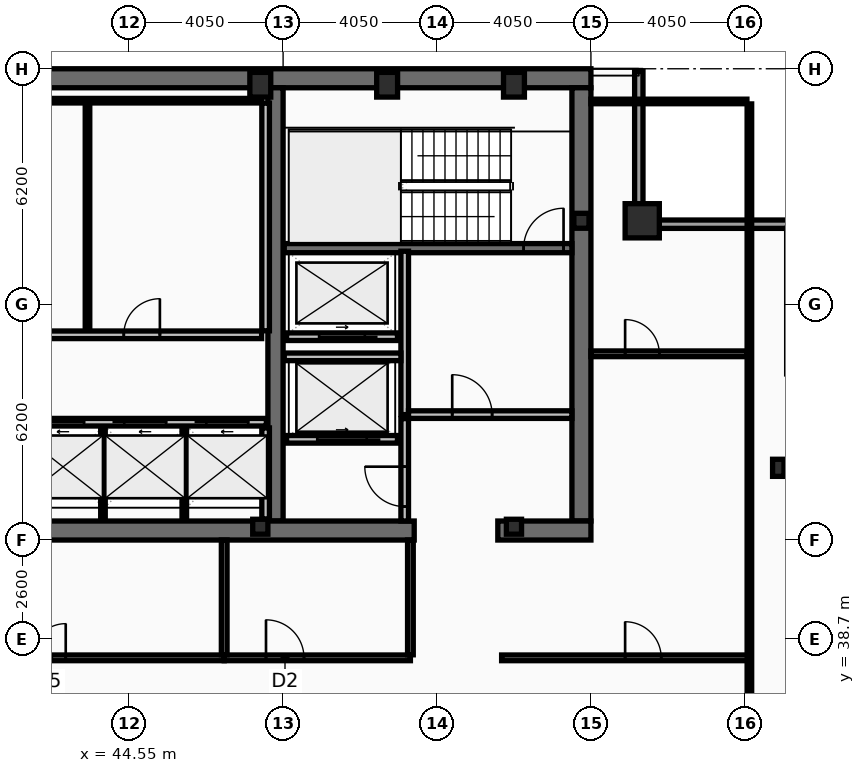
"""IFC4 building model, lengths in metres.
Left out: names, types, materials, properties, quantities, classifications, styles, units other than length and angle.
Written with IfcOpenShell. Run it as: python <this file> out.ifc"""

import sys

from ifc_helpers import new_model, si_unit, direction, frame, frame_2d, origin, origin_2d, place, context, subcontext, project, spatial, rectangle, hollow_rectangle, i_section, extrude, element, fill, save


model = new_model("IFC4")
c1 = context("Model", 3, precision=1e-05, world=origin(), true_north=direction((0.0, 1.0)))
c2 = subcontext(c1, "Body", "Model", "MODEL_VIEW")
j1 = project(units=[si_unit("LENGTHUNIT", "METRE"), si_unit("PLANEANGLEUNIT", "RADIAN")], contexts=[c1])
p1 = place(None, origin())
s1 = spatial("IfcSite", under=j1, at=p1, CompositionType="ELEMENT")
p2 = place(p1, origin())
s2 = spatial("IfcBuilding", under=s1, at=p2, CompositionType="ELEMENT")
p3 = place(p2, frame((0.0, 0.0, 325.4)))
s3 = spatial("IfcBuildingStorey", under=s2, at=p3, CompositionType="ELEMENT", Elevation=325.4)
p4 = place(p3, frame((16.2, 53.45, 0.0), z_axis=(0.0, 0.0, 1.0), x_axis=(1.0, 0.0, 0.0)))
e1 = element("IfcWall", 1, at=p4, inside=s3, PredefinedType="SHEAR", context=c2, shape_type="SweptSolid", body=[
    extrude(rectangle(XDim=40.5, YDim=0.5, at=frame_2d((20.25, 0.0))), origin(), (0.0, 0.0, 1.0), 3.44),
])
p5 = place(p3, frame((56.45, 53.2, 0.0), z_axis=(0.0, 0.0, 1.0), x_axis=(0.0, -1.0, 0.0)))
e2 = element("IfcWall", 2, at=p5, inside=s3, PredefinedType="SHEAR", context=c2, shape_type="SweptSolid", body=[
    extrude(rectangle(XDim=11.4, YDim=0.5, at=frame_2d((5.7, 0.0))), origin(), (0.0, 0.0, 1.0), 3.44),
])
p6 = place(p3, frame((48.4, 41.8, 0.0), z_axis=(0.0, 0.0, 1.0), x_axis=(0.0, 1.0, 0.0)))
e3 = element("IfcWall", 3, at=p6, inside=s3, PredefinedType="SHEAR", context=c2, shape_type="SweptSolid", body=[
    extrude(rectangle(XDim=11.4, YDim=0.4, at=frame_2d((5.7, 0.0))), origin(), (0.0, 0.0, 1.0), 3.44),
])
p7 = place(p3, frame((52.05, 41.55, 0.0), z_axis=(0.0, 0.0, 1.0), x_axis=(-1.0, 0.0, 0.0)))
e4 = element("IfcWall", 4, at=p7, inside=s3, PredefinedType="SHEAR", context=c2, shape_type="SweptSolid", body=[
    extrude(rectangle(XDim=11.3, YDim=0.5, at=frame_2d((5.65, 0.0))), origin(), (0.0, 0.0, 1.0), 3.44),
])
p8 = place(p3, frame((56.7, 41.55, 0.0), z_axis=(0.0, 0.0, 1.0), x_axis=(-1.0, 0.0, 0.0)))
e5 = element("IfcWall", 5, at=p8, inside=s3, PredefinedType="SHEAR", context=c2, shape_type="SweptSolid", body=[
    extrude(rectangle(XDim=2.45, YDim=0.5, at=frame_2d((1.225, 0.0))), origin(), (0.0, 0.0, 1.0), 3.44),
])
p9 = place(p3, frame((48.63, 48.98, 0.0), z_axis=(0.0, 0.0, 1.0), x_axis=(1.0, 0.0, 0.0)))
e6 = element("IfcWall", 6, at=p9, inside=s3, PredefinedType="SHEAR", context=c2, shape_type="SweptSolid", body=[
    extrude(rectangle(XDim=7.57, YDim=0.24, at=frame_2d((3.785, 0.0))), origin(), (0.0, 0.0, 1.0), 3.44),
])
p10 = place(p9, frame((6.3, 0.0, 0.0)))
e7 = element("IfcOpeningElement", 7, at=p10, cuts=e6, PredefinedType="OPENING", context=c2, shape_type="SweptSolid", body=[
    extrude(rectangle(XDim=1.05, YDim=2.15, at=frame_2d((0.525, 1.075))), frame((0.0, 0.13, 0.0), z_axis=(0.0, -1.0, 0.0), x_axis=(1.0, 0.0, 0.0)), (0.0, 0.0, 1.0), 0.26),
])
p11 = place(p3, frame((58.05, 49.7, 0.0), z_axis=(0.0, 0.0, 1.0), x_axis=(1.0, 0.0, 0.0)))
e8 = element("IfcColumn", 8, at=p11, inside=s3, PredefinedType="COLUMN", context=c2, shape_type="SweptSolid", body=[
    extrude(hollow_rectangle(XDim=0.9, YDim=0.9, WallThickness=0.05, at=origin_2d()), origin(), (0.0, 0.0, 1.0), 3.6),
])
for number, where, z_axis, x_axis in (
    (9, (48.0, 53.28, 0.0), (0.0, 0.0, 1.0), (1.0, 0.0, 0.0)),
    (10, (51.337, 53.28, 0.0), (0.0, 0.0, 1.0), (1.0, 0.0, 0.0)),
    (11, (54.675, 53.28, 0.0), (0.0, 0.0, 1.0), (1.0, 0.0, 0.0)),
):
    element("IfcColumn", number, at=place(p3, frame(where, z_axis=z_axis, x_axis=x_axis)), inside=s3, PredefinedType="COLUMN", context=c2, shape_type="SweptSolid", body=[
        extrude(hollow_rectangle(XDim=0.55, YDim=0.65, WallThickness=0.04, at=origin_2d()), origin(), (0.0, 0.0, 1.0), 3.6),
    ])
p12 = place(p3, frame((61.63, 43.2, 0.0), z_axis=(0.0, 0.0, 1.0), x_axis=(1.0, 0.0, 0.0)))
e12 = element("IfcColumn", 12, at=p12, inside=s3, PredefinedType="COLUMN", context=c2, shape_type="SweptSolid", body=[
    extrude(i_section(OverallWidth=0.3, OverallDepth=0.45, WebThickness=0.014, FlangeThickness=0.026, at=origin_2d()), origin(), (0.0, 0.0, 1.0), 3.6),
])
for number, where, z_axis, x_axis in (
    (13, (56.45, 49.7, 0.0), (0.0, 0.0, 1.0), (1.0, 0.0, 0.0)),
    (14, (48.0, 41.65, 0.0), (0.0, 0.0, 1.0), (1.0, 0.0, 0.0)),
    (15, (54.675, 41.65, 0.0), (0.0, 0.0, 1.0), (1.0, 0.0, 0.0)),
):
    element("IfcColumn", number, at=place(p3, frame(where, z_axis=z_axis, x_axis=x_axis)), inside=s3, PredefinedType="COLUMN", context=c2, shape_type="SweptSolid", body=[
        extrude(i_section(OverallWidth=0.399, OverallDepth=0.393, WebThickness=0.023, FlangeThickness=0.037, at=origin_2d()), origin(), (0.0, 0.0, 1.0), 3.6),
    ])
p13 = place(p3, frame((57.96, 53.63, 0.0), z_axis=(0.0, 0.0, 1.0), x_axis=(0.0, -1.0, 0.0)))
e16 = element("IfcWall", 16, at=p13, inside=s3, PredefinedType="SOLIDWALL", context=c2, shape_type="SweptSolid", body=[
    extrude(rectangle(XDim=3.91, YDim=0.22, at=frame_2d((1.955, 0.0))), origin(), (0.0, 0.0, 1.0), 2.88),
])
p14 = place(p3, frame((57.85, 49.61, 0.0), z_axis=(0.0, 0.0, 1.0), x_axis=(1.0, 0.0, 0.0)))
e17 = element("IfcWall", 17, at=p14, inside=s3, PredefinedType="SOLIDWALL", context=c2, shape_type="SweptSolid", body=[
    extrude(rectangle(XDim=4.22, YDim=0.22, at=frame_2d((2.11, 0.0))), origin(), (0.0, 0.0, 1.0), 2.88),
])
p15 = place(p3, frame((41.68, 44.4, 0.0), z_axis=(0.0, 0.0, 1.0), x_axis=(1.0, 0.0, 0.0)))
e18 = element("IfcWall", 18, at=p15, inside=s3, PredefinedType="PARTITIONING", context=c2, shape_type="SweptSolid", body=[
    extrude(rectangle(XDim=6.48, YDim=0.2, at=frame_2d((3.24, 0.0))), origin(), (0.0, 0.0, 1.0), 3.44),
])
p16 = place(p15, frame((0.58, 0.0, 0.0)))
e19 = element("IfcOpeningElement", 19, at=p16, cuts=e18, PredefinedType="OPENING", context=c2, shape_type="SweptSolid", body=[
    extrude(rectangle(XDim=1.1, YDim=2.18, at=frame_2d((0.55, 1.09))), frame((0.0, 0.11, 0.0), z_axis=(0.0, -1.0, 0.0), x_axis=(1.0, 0.0, 0.0)), (0.0, 0.0, 1.0), 0.22),
])
p17 = place(p15, frame((2.74, 0.0, 0.0)))
e20 = element("IfcOpeningElement", 20, at=p17, cuts=e18, PredefinedType="OPENING", context=c2, shape_type="SweptSolid", body=[
    extrude(rectangle(XDim=1.1, YDim=2.18, at=frame_2d((0.55, 1.09))), frame((0.0, 0.11, 0.0), z_axis=(0.0, -1.0, 0.0), x_axis=(1.0, 0.0, 0.0)), (0.0, 0.0, 1.0), 0.22),
])
p18 = place(p15, frame((4.9, 0.0, 0.0)))
e21 = element("IfcOpeningElement", 21, at=p18, cuts=e18, PredefinedType="OPENING", context=c2, shape_type="SweptSolid", body=[
    extrude(rectangle(XDim=1.1, YDim=2.18, at=frame_2d((0.55, 1.09))), frame((0.0, 0.11, 0.0), z_axis=(0.0, -1.0, 0.0), x_axis=(1.0, 0.0, 0.0)), (0.0, 0.0, 1.0), 0.22),
])
p19 = place(p3, frame((51.61, 43.95, 0.0), z_axis=(0.0, 0.0, 1.0), x_axis=(-1.0, 0.0, 0.0)))
e22 = element("IfcWall", 22, at=p19, inside=s3, PredefinedType="PARTITIONING", context=c2, shape_type="SweptSolid", body=[
    extrude(rectangle(XDim=2.92, YDim=0.2, at=frame_2d((1.46, 0.0))), origin(), (0.0, 0.0, 1.0), 3.44),
])
p20 = place(p19, frame((0.81, 0.0, 0.0)))
e23 = element("IfcOpeningElement", 23, at=p20, cuts=e22, PredefinedType="OPENING", context=c2, shape_type="SweptSolid", body=[
    extrude(rectangle(XDim=1.3, YDim=2.18, at=frame_2d((0.65, 1.09))), frame((0.0, 0.11, 0.0), z_axis=(0.0, -1.0, 0.0), x_axis=(1.0, 0.0, 0.0)), (0.0, 0.0, 1.0), 0.22),
])
p21 = place(p3, frame((51.61, 46.65, 0.0), z_axis=(0.0, 0.0, 1.0), x_axis=(-1.0, 0.0, 0.0)))
e24 = element("IfcWall", 24, at=p21, inside=s3, PredefinedType="PARTITIONING", context=c2, shape_type="SweptSolid", body=[
    extrude(rectangle(XDim=2.92, YDim=0.2, at=frame_2d((1.46, 0.0))), origin(), (0.0, 0.0, 1.0), 3.44),
])
p22 = place(p21, frame((0.86, 0.0, 0.0)))
e25 = element("IfcOpeningElement", 25, at=p22, cuts=e24, PredefinedType="OPENING", context=c2, shape_type="SweptSolid", body=[
    extrude(rectangle(XDim=1.2, YDim=2.18, at=frame_2d((0.6, 1.09))), frame((0.0, 0.11, 0.0), z_axis=(0.0, -1.0, 0.0), x_axis=(1.0, 0.0, 0.0)), (0.0, 0.0, 1.0), 0.22),
])
p23 = place(p3, frame((51.8, 44.6, 0.0), z_axis=(0.0, 0.0, 1.0), x_axis=(0.0, 1.0, 0.0)))
e26 = element("IfcWall", 26, at=p23, inside=s3, PredefinedType="PARTITIONING", context=c2, shape_type="SweptSolid", body=[
    extrude(rectangle(XDim=4.3, YDim=0.2, at=frame_2d((2.15, 0.0))), origin(), (0.0, 0.0, 1.0), 3.44),
])
p24 = place(p3, frame((51.9, 44.6, 0.0), z_axis=(0.0, 0.0, 1.0), x_axis=(1.0, 0.0, 0.0)))
e27 = element("IfcWall", 27, at=p24, inside=s3, PredefinedType="PARTITIONING", context=c2, shape_type="SweptSolid", body=[
    extrude(rectangle(XDim=4.3, YDim=0.2, at=frame_2d((2.15, 0.0))), origin(), (0.0, 0.0, 1.0), 3.44),
])
p25 = place(p24, frame((1.15, 0.0, 0.0)))
e28 = element("IfcOpeningElement", 28, at=p25, cuts=e27, PredefinedType="OPENING", context=c2, shape_type="SweptSolid", body=[
    extrude(rectangle(XDim=1.05, YDim=2.15, at=frame_2d((0.525, 1.075))), frame((0.0, 0.11, 0.0), z_axis=(0.0, -1.0, 0.0), x_axis=(1.0, 0.0, 0.0)), (0.0, 0.0, 1.0), 0.22),
])
p26 = place(p3, frame((48.63, 46.12, 0.0), z_axis=(0.0, 0.0, 1.0), x_axis=(1.0, 0.0, 0.0)))
e29 = element("IfcWall", 29, at=p26, inside=s3, PredefinedType="PARTITIONING", context=c2, shape_type="SweptSolid", body=[
    extrude(rectangle(XDim=3.07, YDim=0.2, at=frame_2d((1.535, 0.0))), origin(), (0.0, 0.0, 1.0), 3.44),
])
p27 = place(p3, frame((51.8, 41.8, 0.0), z_axis=(0.0, 0.0, 1.0), x_axis=(0.0, 1.0, 0.0)))
e30 = element("IfcWall", 30, at=p27, inside=s3, PredefinedType="PARTITIONING", context=c2, shape_type="SweptSolid", body=[
    extrude(rectangle(XDim=2.695, YDim=0.2, at=frame_2d((1.348, 0.0))), origin(), (0.0, 0.0, 1.0), 3.44),
])
p28 = place(p27, frame((0.38, 0.0, 0.0)))
e31 = element("IfcOpeningElement", 31, at=p28, cuts=e30, PredefinedType="OPENING", context=c2, shape_type="SweptSolid", body=[
    extrude(rectangle(XDim=1.05, YDim=2.15, at=frame_2d((0.525, 1.075))), frame((0.0, 0.11, 0.0), z_axis=(0.0, -1.0, 0.0), x_axis=(1.0, 0.0, 0.0)), (0.0, 0.0, 1.0), 0.22),
])
p29 = place(p3, frame((48.14, 46.805, 0.0), z_axis=(0.0, 0.0, 1.0), x_axis=(0.0, 1.0, 0.0)))
e32 = element("IfcWall", 32, at=p29, inside=s3, PredefinedType="PARTITIONING", context=c2, shape_type="SweptSolid", body=[
    extrude(rectangle(XDim=5.99, YDim=0.2, at=frame_2d((2.995, 0.0))), origin(), (0.0, 0.0, 1.0), 3.44),
])
p30 = place(p3, frame((40.685, 52.86, 0.0), z_axis=(0.0, 0.0, 1.0), x_axis=(1.0, 0.0, 0.0)))
e33 = element("IfcWall", 33, at=p30, inside=s3, PredefinedType="PARTITIONING", context=c2, shape_type="SweptSolid", body=[
    extrude(rectangle(XDim=7.35, YDim=0.12, at=frame_2d((3.675, 0.0))), origin(), (0.0, 0.0, 1.0), 3.44),
])
p31 = place(p3, frame((43.453, 46.805, 0.0), z_axis=(0.0, 0.0, 1.0), x_axis=(0.0, 1.0, 0.0)))
e34 = element("IfcWall", 34, at=p31, inside=s3, PredefinedType="PARTITIONING", context=c2, shape_type="SweptSolid", body=[
    extrude(rectangle(XDim=5.99, YDim=0.12, at=frame_2d((2.995, 0.0))), origin(), (0.0, 0.0, 1.0), 3.44),
])
p32 = place(p3, frame((40.685, 46.7, 0.0), z_axis=(0.0, 0.0, 1.0), x_axis=(1.0, 0.0, 0.0)))
e35 = element("IfcWall", 35, at=p32, inside=s3, PredefinedType="PARTITIONING", context=c2, shape_type="SweptSolid", body=[
    extrude(rectangle(XDim=7.35, YDim=0.2, at=frame_2d((3.675, 0.0))), origin(), (0.0, 0.0, 1.0), 3.44),
])
p33 = place(p32, frame((0.55, 0.0, 0.0)))
e36 = element("IfcOpeningElement", 36, at=p33, cuts=e35, PredefinedType="OPENING", context=c2, shape_type="SweptSolid", body=[
    extrude(rectangle(XDim=0.95, YDim=2.1, at=frame_2d((0.475, 1.05))), frame((0.0, 0.11, 0.0), z_axis=(0.0, -1.0, 0.0), x_axis=(1.0, 0.0, 0.0)), (0.0, 0.0, 1.0), 0.22),
])
p34 = place(p32, frame((3.723, 0.0, 0.0)))
e37 = element("IfcOpeningElement", 37, at=p34, cuts=e35, PredefinedType="OPENING", context=c2, shape_type="SweptSolid", body=[
    extrude(rectangle(XDim=0.95, YDim=2.1, at=frame_2d((0.475, 1.05))), frame((0.0, 0.11, 0.0), z_axis=(0.0, -1.0, 0.0), x_axis=(1.0, 0.0, 0.0)), (0.0, 0.0, 1.0), 0.22),
])
p35 = place(p3, frame((48.14, 41.85, 0.0), z_axis=(0.0, 0.0, 1.0), x_axis=(0.0, 1.0, 0.0)))
e38 = element("IfcWall", 38, at=p35, inside=s3, PredefinedType="PARTITIONING", context=c2, shape_type="SweptSolid", body=[
    extrude(rectangle(XDim=2.4, YDim=0.2, at=frame_2d((1.2, 0.0))), origin(), (0.0, 0.0, 1.0), 3.44),
])
for number, where, z_axis, x_axis in (
    (39, (43.86, 41.85, 0.0), (0.0, 0.0, 1.0), (0.0, 1.0, 0.0)),
    (40, (46.0, 41.85, 0.0), (0.0, 0.0, 1.0), (0.0, 1.0, 0.0)),
):
    element("IfcWall", number, at=place(p3, frame(where, z_axis=z_axis, x_axis=x_axis)), inside=s3, PredefinedType="PARTITIONING", context=c2, shape_type="SweptSolid", body=[
        extrude(rectangle(XDim=2.4, YDim=0.12, at=frame_2d((1.2, 0.0))), origin(), (0.0, 0.0, 1.0), 3.44),
    ])
p36 = place(p3, frame((40.88, 38.2, 0.0), z_axis=(0.0, 0.0, 1.0), x_axis=(1.0, 0.0, 0.0)))
e41 = element("IfcWall", 41, at=p36, inside=s3, PredefinedType="PARTITIONING", context=c2, shape_type="SweptSolid", body=[
    extrude(rectangle(XDim=6.17, YDim=0.15, at=frame_2d((3.085, 0.0))), origin(), (0.0, 0.0, 1.0), 3.44),
])
p37 = place(p36, frame((1.1, 0.0, 0.0)))
e42 = element("IfcOpeningElement", 42, at=p37, cuts=e41, PredefinedType="OPENING", context=c2, shape_type="SweptSolid", body=[
    extrude(rectangle(XDim=0.9, YDim=2.05, at=frame_2d((0.45, 1.025))), frame((0.0, 0.085, 0.0), z_axis=(0.0, -1.0, 0.0), x_axis=(1.0, 0.0, 0.0)), (0.0, 0.0, 1.0), 0.17),
])
p38 = place(p3, frame((47.05, 38.2, 0.0), z_axis=(0.0, 0.0, 1.0), x_axis=(1.0, 0.0, 0.0)))
e43 = element("IfcWall", 43, at=p38, inside=s3, PredefinedType="PARTITIONING", context=c2, shape_type="SweptSolid", body=[
    extrude(rectangle(XDim=4.9, YDim=0.15, at=frame_2d((2.45, 0.0))), origin(), (0.0, 0.0, 1.0), 2.83),
])
p39 = place(p38, frame((1.1, 0.0, 0.0)))
e44 = element("IfcOpeningElement", 44, at=p39, cuts=e43, PredefinedType="OPENING", context=c2, shape_type="SweptSolid", body=[
    extrude(rectangle(XDim=1.0, YDim=2.05, at=frame_2d((0.5, 1.025))), frame((0.0, 0.085, 0.0), z_axis=(0.0, -1.0, 0.0), x_axis=(1.0, 0.0, 0.0)), (0.0, 0.0, 1.0), 0.17),
])
for number, where, z_axis, x_axis in (
    (45, (47.05, 38.28, 0.0), (0.0, 0.0, 1.0), (0.0, 1.0, 0.0)),
    (46, (51.95, 38.28, 0.0), (0.0, 0.0, 1.0), (0.0, 1.0, 0.0)),
):
    element("IfcWall", number, at=place(p3, frame(where, z_axis=z_axis, x_axis=x_axis)), inside=s3, PredefinedType="PARTITIONING", context=c2, shape_type="SweptSolid", body=[
        extrude(rectangle(XDim=3.02, YDim=0.15, at=frame_2d((1.51, 0.0))), origin(), (0.0, 0.0, 1.0), 3.44),
    ])
p40 = place(p3, frame((54.35, 38.2, 0.0), z_axis=(0.0, 0.0, 1.0), x_axis=(1.0, 0.0, 0.0)))
e47 = element("IfcWall", 47, at=p40, inside=s3, PredefinedType="PARTITIONING", context=c2, shape_type="SweptSolid", body=[
    extrude(rectangle(XDim=6.52, YDim=0.15, at=frame_2d((3.26, 0.0))), origin(), (0.0, 0.0, 1.0), 2.83),
])
p41 = place(p40, frame((3.25, 0.0, 0.0)))
e48 = element("IfcOpeningElement", 48, at=p41, cuts=e47, PredefinedType="OPENING", context=c2, shape_type="SweptSolid", body=[
    extrude(rectangle(XDim=0.95, YDim=2.05, at=frame_2d((0.475, 1.025))), frame((0.0, 0.085, 0.0), z_axis=(0.0, -1.0, 0.0), x_axis=(1.0, 0.0, 0.0)), (0.0, 0.0, 1.0), 0.17),
])
p42 = place(p3, frame((56.7, 46.2, 0.0), z_axis=(0.0, 0.0, 1.0), x_axis=(1.0, 0.0, 0.0)))
e49 = element("IfcWall", 49, at=p42, inside=s3, PredefinedType="PARTITIONING", context=c2, shape_type="SweptSolid", body=[
    extrude(rectangle(XDim=4.105, YDim=0.15, at=frame_2d((2.052, 0.0))), origin(), (0.0, 0.0, 1.0), 2.88),
])
p43 = place(p42, frame((0.9, 0.0, 0.0)))
e50 = element("IfcOpeningElement", 50, at=p43, cuts=e49, PredefinedType="OPENING", context=c2, shape_type="SweptSolid", body=[
    extrude(rectangle(XDim=0.9, YDim=2.05, at=frame_2d((0.45, 1.025))), frame((0.0, 0.085, 0.0), z_axis=(0.0, -1.0, 0.0), x_axis=(1.0, 0.0, 0.0)), (0.0, 0.0, 1.0), 0.17),
])
p44 = place(p3, frame((60.87, 10.665, 0.0), z_axis=(0.0, 0.0, 1.0), x_axis=(0.0, 1.0, 0.0)))
e51 = element("IfcWall", 51, at=p44, inside=s3, PredefinedType="PARTITIONING", context=c2, shape_type="SweptSolid", body=[
    extrude(rectangle(XDim=42.11, YDim=0.12, at=frame_2d((21.055, 0.0))), origin(), (0.0, 0.0, 1.0), 2.83),
])
p45 = place(p3, frame((56.7, 52.84, 0.0), z_axis=(0.0, 0.0, 1.0), x_axis=(1.0, 0.0, 0.0)))
e52 = element("IfcWall", 52, at=p45, inside=s3, PredefinedType="PARTITIONING", context=c2, shape_type="SweptSolid", body=[
    extrude(rectangle(XDim=4.105, YDim=0.12, at=frame_2d((2.052, 0.0))), origin(), (0.0, 0.0, 1.0), 3.44),
])
p46 = place(p10, origin())
e53 = element("IfcDoor", 53, at=p46, inside=s3, OperationType="SINGLE_SWING_RIGHT", PredefinedType="DOOR", context=c2, shape_type="SweptSolid", body=[
    extrude(rectangle(XDim=1.05, YDim=2.15, at=frame_2d((0.525, 1.075))), frame((0.0, 0.025, 0.0), z_axis=(0.0, -1.0, 0.0), x_axis=(1.0, 0.0, 0.0)), (0.0, 0.0, 1.0), 0.05),
])
fill(e7, e53)
p47 = place(p16, origin())
e54 = element("IfcDoor", 54, at=p47, inside=s3, OperationType="SLIDING_TO_LEFT", PredefinedType="DOOR", context=c2, shape_type="SweptSolid", body=[
    extrude(rectangle(XDim=1.1, YDim=2.18, at=frame_2d((0.55, 1.09))), frame((0.0, 0.025, 0.0), z_axis=(0.0, -1.0, 0.0), x_axis=(1.0, 0.0, 0.0)), (0.0, 0.0, 1.0), 0.05),
])
fill(e19, e54)
p48 = place(p17, origin())
e55 = element("IfcDoor", 55, at=p48, inside=s3, OperationType="SLIDING_TO_LEFT", PredefinedType="DOOR", context=c2, shape_type="SweptSolid", body=[
    extrude(rectangle(XDim=1.1, YDim=2.18, at=frame_2d((0.55, 1.09))), frame((0.0, 0.025, 0.0), z_axis=(0.0, -1.0, 0.0), x_axis=(1.0, 0.0, 0.0)), (0.0, 0.0, 1.0), 0.05),
])
fill(e20, e55)
p49 = place(p18, origin())
e56 = element("IfcDoor", 56, at=p49, inside=s3, OperationType="SLIDING_TO_LEFT", PredefinedType="DOOR", context=c2, shape_type="SweptSolid", body=[
    extrude(rectangle(XDim=1.1, YDim=2.18, at=frame_2d((0.55, 1.09))), frame((0.0, 0.025, 0.0), z_axis=(0.0, -1.0, 0.0), x_axis=(1.0, 0.0, 0.0)), (0.0, 0.0, 1.0), 0.05),
])
fill(e21, e56)
p50 = place(p20, origin())
e57 = element("IfcDoor", 57, at=p50, inside=s3, OperationType="SLIDING_TO_LEFT", PredefinedType="DOOR", context=c2, shape_type="SweptSolid", body=[
    extrude(rectangle(XDim=1.3, YDim=2.18, at=frame_2d((0.65, 1.09))), frame((0.0, 0.025, 0.0), z_axis=(0.0, -1.0, 0.0), x_axis=(1.0, 0.0, 0.0)), (0.0, 0.0, 1.0), 0.05),
])
fill(e23, e57)
p51 = place(p22, origin())
e58 = element("IfcDoor", 58, at=p51, inside=s3, OperationType="SLIDING_TO_LEFT", PredefinedType="DOOR", context=c2, shape_type="SweptSolid", body=[
    extrude(rectangle(XDim=1.2, YDim=2.18, at=frame_2d((0.6, 1.09))), frame((0.0, 0.025, 0.0), z_axis=(0.0, -1.0, 0.0), x_axis=(1.0, 0.0, 0.0)), (0.0, 0.0, 1.0), 0.05),
])
fill(e25, e58)
p52 = place(p25, origin())
e59 = element("IfcDoor", 59, at=p52, inside=s3, OperationType="SINGLE_SWING_LEFT", PredefinedType="DOOR", context=c2, shape_type="SweptSolid", body=[
    extrude(rectangle(XDim=1.05, YDim=2.15, at=frame_2d((0.525, 1.075))), frame((0.0, 0.025, 0.0), z_axis=(0.0, -1.0, 0.0), x_axis=(1.0, 0.0, 0.0)), (0.0, 0.0, 1.0), 0.05),
])
fill(e28, e59)
p53 = place(p28, origin())
e60 = element("IfcDoor", 60, at=p53, inside=s3, OperationType="SINGLE_SWING_RIGHT", PredefinedType="DOOR", context=c2, shape_type="SweptSolid", body=[
    extrude(rectangle(XDim=1.05, YDim=2.15, at=frame_2d((0.525, 1.075))), frame((0.0, 0.025, 0.0), z_axis=(0.0, -1.0, 0.0), x_axis=(1.0, 0.0, 0.0)), (0.0, 0.0, 1.0), 0.05),
])
fill(e31, e60)
p54 = place(p34, origin())
e61 = element("IfcDoor", 61, at=p54, inside=s3, OperationType="SINGLE_SWING_RIGHT", PredefinedType="DOOR", context=c2, shape_type="SweptSolid", body=[
    extrude(rectangle(XDim=0.95, YDim=2.1, at=frame_2d((0.475, 1.05))), frame((0.0, 0.025, 0.0), z_axis=(0.0, -1.0, 0.0), x_axis=(1.0, 0.0, 0.0)), (0.0, 0.0, 1.0), 0.05),
])
fill(e37, e61)
p55 = place(p37, origin())
e62 = element("IfcDoor", 62, at=p55, inside=s3, OperationType="SINGLE_SWING_RIGHT", PredefinedType="DOOR", context=c2, shape_type="SweptSolid", body=[
    extrude(rectangle(XDim=0.9, YDim=2.05, at=frame_2d((0.45, 1.025))), frame((0.0, 0.025, 0.0), z_axis=(0.0, -1.0, 0.0), x_axis=(1.0, 0.0, 0.0)), (0.0, 0.0, 1.0), 0.05),
])
fill(e42, e62)
p56 = place(p39, origin())
e63 = element("IfcDoor", 63, at=p56, inside=s3, OperationType="SINGLE_SWING_LEFT", PredefinedType="DOOR", context=c2, shape_type="SweptSolid", body=[
    extrude(rectangle(XDim=1.0, YDim=2.05, at=frame_2d((0.5, 1.025))), frame((0.0, 0.025, 0.0), z_axis=(0.0, -1.0, 0.0), x_axis=(1.0, 0.0, 0.0)), (0.0, 0.0, 1.0), 0.05),
])
fill(e44, e63)
p57 = place(p41, origin())
e64 = element("IfcDoor", 64, at=p57, inside=s3, OperationType="SINGLE_SWING_LEFT", PredefinedType="DOOR", context=c2, shape_type="SweptSolid", body=[
    extrude(rectangle(XDim=0.95, YDim=2.05, at=frame_2d((0.475, 1.025))), frame((0.0, 0.025, 0.0), z_axis=(0.0, -1.0, 0.0), x_axis=(1.0, 0.0, 0.0)), (0.0, 0.0, 1.0), 0.05),
])
fill(e48, e64)
p58 = place(p43, origin())
e65 = element("IfcDoor", 65, at=p58, inside=s3, OperationType="SINGLE_SWING_LEFT", PredefinedType="DOOR", context=c2, shape_type="SweptSolid", body=[
    extrude(rectangle(XDim=0.9, YDim=2.05, at=frame_2d((0.45, 1.025))), frame((0.0, 0.025, 0.0), z_axis=(0.0, -1.0, 0.0), x_axis=(1.0, 0.0, 0.0)), (0.0, 0.0, 1.0), 0.05),
])
fill(e50, e65)
save(model, sys.argv[1])
